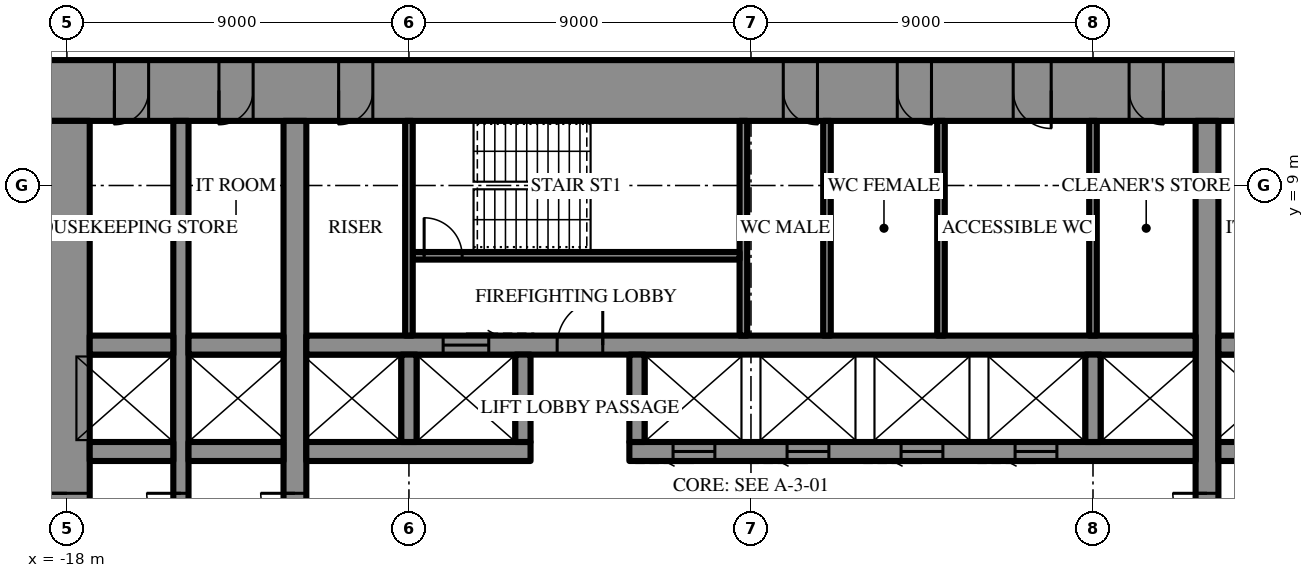
"""IFC4 building model, lengths in metres.
Left out: names, types, materials, properties, quantities, classifications, styles, units other than length and angle.
Written with IfcOpenShell. Run it as: python <this file> out.ifc"""

import sys

from ifc_helpers import new_model, si_unit, direction, frame, frame_2d, origin, place, context, subcontext, project, spatial, rectangle, extrude, element, fill, save


model = new_model("IFC4")
c1 = context("Model", 3, precision=1e-05, world=origin(), true_north=direction((0.0, 1.0)))
c2 = subcontext(c1, "Body", "Model", "MODEL_VIEW")
j1 = project(units=[si_unit("LENGTHUNIT", "METRE"), si_unit("PLANEANGLEUNIT", "RADIAN")], contexts=[c1])
p1 = place(None, origin())
s1 = spatial("IfcSite", under=j1, at=p1, CompositionType="ELEMENT")
p2 = place(p1, origin())
s2 = spatial("IfcBuilding", under=s1, at=p2, CompositionType="ELEMENT")
p3 = place(p2, frame((0.0, 0.0, 69.7)))
s3 = spatial("IfcBuildingStorey", under=s2, at=p3, CompositionType="ELEMENT", Elevation=69.7)
p4 = place(p3, frame((-18.6, 11.5, 0.0), z_axis=(0.0, 0.0, 1.0), x_axis=(1.0, 0.0, 0.0)))
e1 = element("IfcWall", 1, at=p4, inside=s3, PredefinedType="SHEAR", context=c2, shape_type="SweptSolid", body=[
    extrude(rectangle(XDim=37.2, YDim=1.6, at=frame_2d((18.6, 0.0))), origin(), (0.0, 0.0, 1.0), 4.2),
])
p5 = place(p4, frame((19.45, 0.0, 0.0)))
e2 = element("IfcOpeningElement", 2, at=p5, cuts=e1, PredefinedType="OPENING", context=c2, shape_type="SweptSolid", body=[
    extrude(rectangle(XDim=0.9, YDim=2.2, at=frame_2d((0.45, 1.1))), frame((0.0, 0.81, 0.0), z_axis=(0.0, -1.0, 0.0), x_axis=(1.0, 0.0, 0.0)), (0.0, 0.0, 1.0), 1.62),
])
p6 = place(p4, frame((22.45, 0.0, 0.0)))
e3 = element("IfcOpeningElement", 3, at=p6, cuts=e1, PredefinedType="OPENING", context=c2, shape_type="SweptSolid", body=[
    extrude(rectangle(XDim=0.9, YDim=2.2, at=frame_2d((0.45, 1.1))), frame((0.0, 0.81, 0.0), z_axis=(0.0, -1.0, 0.0), x_axis=(1.0, 0.0, 0.0)), (0.0, 0.0, 1.0), 1.62),
])
p7 = place(p4, frame((25.5, 0.0, 0.0)))
e4 = element("IfcOpeningElement", 4, at=p7, cuts=e1, PredefinedType="OPENING", context=c2, shape_type="SweptSolid", body=[
    extrude(rectangle(XDim=1.0, YDim=2.2, at=frame_2d((0.5, 1.1))), frame((0.0, 0.81, 0.0), z_axis=(0.0, -1.0, 0.0), x_axis=(1.0, 0.0, 0.0)), (0.0, 0.0, 1.0), 1.62),
])
p8 = place(p4, frame((1.85, 0.0, 0.0)))
e5 = element("IfcOpeningElement", 5, at=p8, cuts=e1, PredefinedType="OPENING", context=c2, shape_type="SweptSolid", body=[
    extrude(rectangle(XDim=0.9, YDim=2.2, at=frame_2d((0.45, 1.1))), frame((0.0, 0.81, 0.0), z_axis=(0.0, -1.0, 0.0), x_axis=(1.0, 0.0, 0.0)), (0.0, 0.0, 1.0), 1.62),
])
p9 = place(p4, frame((4.6, 0.0, 0.0)))
e6 = element("IfcOpeningElement", 6, at=p9, cuts=e1, PredefinedType="OPENING", context=c2, shape_type="SweptSolid", body=[
    extrude(rectangle(XDim=0.9, YDim=2.2, at=frame_2d((0.45, 1.1))), frame((0.0, 0.81, 0.0), z_axis=(0.0, -1.0, 0.0), x_axis=(1.0, 0.0, 0.0)), (0.0, 0.0, 1.0), 1.62),
])
p10 = place(p4, frame((7.75, 0.0, 0.0)))
e7 = element("IfcOpeningElement", 7, at=p10, cuts=e1, PredefinedType="OPENING", context=c2, shape_type="SweptSolid", body=[
    extrude(rectangle(XDim=0.9, YDim=2.2, at=frame_2d((0.45, 1.1))), frame((0.0, 0.81, 0.0), z_axis=(0.0, -1.0, 0.0), x_axis=(1.0, 0.0, 0.0)), (0.0, 0.0, 1.0), 1.62),
])
p11 = place(p4, frame((28.55, 0.0, 0.0)))
e8 = element("IfcOpeningElement", 8, at=p11, cuts=e1, PredefinedType="OPENING", context=c2, shape_type="SweptSolid", body=[
    extrude(rectangle(XDim=0.9, YDim=2.2, at=frame_2d((0.45, 1.1))), frame((0.0, 0.81, 0.0), z_axis=(0.0, -1.0, 0.0), x_axis=(1.0, 0.0, 0.0)), (0.0, 0.0, 1.0), 1.62),
])
p12 = place(p4, frame((31.7, 0.0, 0.0)))
e9 = element("IfcOpeningElement", 9, at=p12, cuts=e1, PredefinedType="OPENING", context=c2, shape_type="SweptSolid", body=[
    extrude(rectangle(XDim=0.9, YDim=2.2, at=frame_2d((0.45, 1.1))), frame((0.0, 0.81, 0.0), z_axis=(0.0, -1.0, 0.0), x_axis=(1.0, 0.0, 0.0)), (0.0, 0.0, 1.0), 1.62),
])
p13 = place(p4, frame((34.45, 0.0, 0.0)))
e10 = element("IfcOpeningElement", 10, at=p13, cuts=e1, PredefinedType="OPENING", context=c2, shape_type="SweptSolid", body=[
    extrude(rectangle(XDim=0.9, YDim=2.2, at=frame_2d((0.45, 1.1))), frame((0.0, 0.81, 0.0), z_axis=(0.0, -1.0, 0.0), x_axis=(1.0, 0.0, 0.0)), (0.0, 0.0, 1.0), 1.62),
])
p14 = place(p3, frame((-18.0, 10.7, 0.0), z_axis=(0.0, 0.0, 1.0), x_axis=(0.0, -1.0, 0.0)))
e11 = element("IfcWall", 11, at=p14, inside=s3, PredefinedType="SHEAR", context=c2, shape_type="SweptSolid", body=[
    extrude(rectangle(XDim=21.4, YDim=1.2, at=frame_2d((10.7, 0.0))), origin(), (0.0, 0.0, 1.0), 4.2),
])
p15 = place(p14, frame((9.8, 0.0, 0.0)))
e12 = element("IfcOpeningElement", 12, at=p15, cuts=e11, PredefinedType="OPENING", context=c2, shape_type="SweptSolid", body=[
    extrude(rectangle(XDim=1.8, YDim=2.4, at=frame_2d((0.9, 1.2))), frame((0.0, 0.61, 0.0), z_axis=(0.0, -1.0, 0.0), x_axis=(1.0, 0.0, 0.0)), (0.0, 0.0, 1.0), 1.22),
])
p16 = place(p3, frame((12.0, -10.7, 0.0), z_axis=(0.0, 0.0, 1.0), x_axis=(0.0, 1.0, 0.0)))
e13 = element("IfcWall", 13, at=p16, inside=s3, PredefinedType="SHEAR", context=c2, shape_type="SweptSolid", body=[
    extrude(rectangle(XDim=21.4, YDim=0.6, at=frame_2d((10.7, 0.0))), origin(), (0.0, 0.0, 1.0), 4.2),
])
p17 = place(p16, frame((9.8, 0.0, 0.0)))
e14 = element("IfcOpeningElement", 14, at=p17, cuts=e13, PredefinedType="OPENING", context=c2, shape_type="SweptSolid", body=[
    extrude(rectangle(XDim=1.8, YDim=2.4, at=frame_2d((0.9, 1.2))), frame((0.0, 0.31, 0.0), z_axis=(0.0, -1.0, 0.0), x_axis=(1.0, 0.0, 0.0)), (0.0, 0.0, 1.0), 0.62),
])
p18 = place(p3, frame((-12.0, -10.7, 0.0), z_axis=(0.0, 0.0, 1.0), x_axis=(0.0, 1.0, 0.0)))
e15 = element("IfcWall", 15, at=p18, inside=s3, PredefinedType="SHEAR", context=c2, shape_type="SweptSolid", body=[
    extrude(rectangle(XDim=21.4, YDim=0.6, at=frame_2d((10.7, 0.0))), origin(), (0.0, 0.0, 1.0), 4.2),
])
p19 = place(p18, frame((9.8, 0.0, 0.0)))
e16 = element("IfcOpeningElement", 16, at=p19, cuts=e15, PredefinedType="OPENING", context=c2, shape_type="SweptSolid", body=[
    extrude(rectangle(XDim=1.8, YDim=2.4, at=frame_2d((0.9, 1.2))), frame((0.0, 0.31, 0.0), z_axis=(0.0, -1.0, 0.0), x_axis=(1.0, 0.0, 0.0)), (0.0, 0.0, 1.0), 0.62),
])
p20 = place(p3, frame((-15.0, -10.7, 0.0), z_axis=(0.0, 0.0, 1.0), x_axis=(0.0, 1.0, 0.0)))
e17 = element("IfcWall", 17, at=p20, inside=s3, PredefinedType="SHEAR", context=c2, shape_type="SweptSolid", body=[
    extrude(rectangle(XDim=21.4, YDim=0.4, at=frame_2d((10.7, 0.0))), origin(), (0.0, 0.0, 1.0), 4.2),
])
p21 = place(p20, frame((9.8, 0.0, 0.0)))
e18 = element("IfcOpeningElement", 18, at=p21, cuts=e17, PredefinedType="OPENING", context=c2, shape_type="SweptSolid", body=[
    extrude(rectangle(XDim=1.8, YDim=2.4, at=frame_2d((0.9, 1.2))), frame((0.0, 0.21, 0.0), z_axis=(0.0, -1.0, 0.0), x_axis=(1.0, 0.0, 0.0)), (0.0, 0.0, 1.0), 0.42),
])
p22 = place(p3, frame((-17.4, 2.0, 0.0), z_axis=(0.0, 0.0, 1.0), x_axis=(1.0, 0.0, 0.0)))
e19 = element("IfcWall", 19, at=p22, inside=s3, PredefinedType="SHEAR", context=c2, shape_type="SweptSolid", body=[
    extrude(rectangle(XDim=2.2, YDim=0.5, at=frame_2d((1.1, 0.0))), origin(), (0.0, 0.0, 1.0), 4.2),
])
p23 = place(p3, frame((-14.8, 2.0, 0.0), z_axis=(0.0, 0.0, 1.0), x_axis=(1.0, 0.0, 0.0)))
e20 = element("IfcWall", 20, at=p23, inside=s3, PredefinedType="SHEAR", context=c2, shape_type="SweptSolid", body=[
    extrude(rectangle(XDim=2.5, YDim=0.5, at=frame_2d((1.25, 0.0))), origin(), (0.0, 0.0, 1.0), 4.2),
])
p24 = place(p3, frame((-11.7, 2.0, 0.0), z_axis=(0.0, 0.0, 1.0), x_axis=(1.0, 0.0, 0.0)))
e21 = element("IfcWall", 21, at=p24, inside=s3, PredefinedType="SHEAR", context=c2, shape_type="SweptSolid", body=[
    extrude(rectangle(XDim=5.9, YDim=0.5, at=frame_2d((2.95, 0.0))), origin(), (0.0, 0.0, 1.0), 4.2),
])
p25 = place(p3, frame((-3.2, 2.0, 0.0), z_axis=(0.0, 0.0, 1.0), x_axis=(1.0, 0.0, 0.0)))
e22 = element("IfcWall", 22, at=p25, inside=s3, PredefinedType="SHEAR", context=c2, shape_type="SweptSolid", body=[
    extrude(rectangle(XDim=14.9, YDim=0.5, at=frame_2d((7.45, 0.0))), origin(), (0.0, 0.0, 1.0), 4.2),
])
p26 = place(p25, frame((1.15, 0.0, 0.0)))
e23 = element("IfcOpeningElement", 23, at=p26, cuts=e22, PredefinedType="OPENING", context=c2, shape_type="SweptSolid", body=[
    extrude(rectangle(XDim=1.1, YDim=2.2, at=frame_2d((0.55, 1.1))), frame((0.0, 0.26, 0.0), z_axis=(0.0, -1.0, 0.0), x_axis=(1.0, 0.0, 0.0)), (0.0, 0.0, 1.0), 0.52),
])
p27 = place(p25, frame((4.15, 0.0, 0.0)))
e24 = element("IfcOpeningElement", 24, at=p27, cuts=e22, PredefinedType="OPENING", context=c2, shape_type="SweptSolid", body=[
    extrude(rectangle(XDim=1.1, YDim=2.2, at=frame_2d((0.55, 1.1))), frame((0.0, 0.26, 0.0), z_axis=(0.0, -1.0, 0.0), x_axis=(1.0, 0.0, 0.0)), (0.0, 0.0, 1.0), 0.52),
])
p28 = place(p25, frame((7.15, 0.0, 0.0)))
e25 = element("IfcOpeningElement", 25, at=p28, cuts=e22, PredefinedType="OPENING", context=c2, shape_type="SweptSolid", body=[
    extrude(rectangle(XDim=1.1, YDim=2.2, at=frame_2d((0.55, 1.1))), frame((0.0, 0.26, 0.0), z_axis=(0.0, -1.0, 0.0), x_axis=(1.0, 0.0, 0.0)), (0.0, 0.0, 1.0), 0.52),
])
p29 = place(p25, frame((10.15, 0.0, 0.0)))
e26 = element("IfcOpeningElement", 26, at=p29, cuts=e22, PredefinedType="OPENING", context=c2, shape_type="SweptSolid", body=[
    extrude(rectangle(XDim=1.1, YDim=2.2, at=frame_2d((0.55, 1.1))), frame((0.0, 0.26, 0.0), z_axis=(0.0, -1.0, 0.0), x_axis=(1.0, 0.0, 0.0)), (0.0, 0.0, 1.0), 0.52),
])
p30 = place(p3, frame((12.3, 2.0, 0.0), z_axis=(0.0, 0.0, 1.0), x_axis=(1.0, 0.0, 0.0)))
e27 = element("IfcWall", 27, at=p30, inside=s3, PredefinedType="SHEAR", context=c2, shape_type="SweptSolid", body=[
    extrude(rectangle(XDim=2.5, YDim=0.5, at=frame_2d((1.25, 0.0))), origin(), (0.0, 0.0, 1.0), 4.2),
])
p31 = place(p3, frame((-17.4, 4.8, 0.0), z_axis=(0.0, 0.0, 1.0), x_axis=(1.0, 0.0, 0.0)))
e28 = element("IfcWall", 28, at=p31, inside=s3, PredefinedType="SHEAR", context=c2, shape_type="SweptSolid", body=[
    extrude(rectangle(XDim=2.2, YDim=0.5, at=frame_2d((1.1, 0.0))), origin(), (0.0, 0.0, 1.0), 4.2),
])
p32 = place(p3, frame((-14.8, 4.8, 0.0), z_axis=(0.0, 0.0, 1.0), x_axis=(1.0, 0.0, 0.0)))
e29 = element("IfcWall", 29, at=p32, inside=s3, PredefinedType="SHEAR", context=c2, shape_type="SweptSolid", body=[
    extrude(rectangle(XDim=2.5, YDim=0.5, at=frame_2d((1.25, 0.0))), origin(), (0.0, 0.0, 1.0), 4.2),
])
p33 = place(p3, frame((-11.7, 4.8, 0.0), z_axis=(0.0, 0.0, 1.0), x_axis=(1.0, 0.0, 0.0)))
e30 = element("IfcWall", 30, at=p33, inside=s3, PredefinedType="SHEAR", context=c2, shape_type="SweptSolid", body=[
    extrude(rectangle(XDim=23.4, YDim=0.5, at=frame_2d((11.7, 0.0))), origin(), (0.0, 0.0, 1.0), 4.2),
])
p34 = place(p33, frame((6.6, 0.0, 0.0)))
e31 = element("IfcOpeningElement", 31, at=p34, cuts=e30, PredefinedType="OPENING", context=c2, shape_type="SweptSolid", body=[
    extrude(rectangle(XDim=1.2, YDim=2.2, at=frame_2d((0.6, 1.1))), frame((0.0, 0.26, 0.0), z_axis=(0.0, -1.0, 0.0), x_axis=(1.0, 0.0, 0.0)), (0.0, 0.0, 1.0), 0.52),
])
p35 = place(p33, frame((3.6, 0.0, 0.0)))
e32 = element("IfcOpeningElement", 32, at=p35, cuts=e30, PredefinedType="OPENING", context=c2, shape_type="SweptSolid", body=[
    extrude(rectangle(XDim=1.2, YDim=2.2, at=frame_2d((0.6, 1.1))), frame((0.0, 0.26, 0.0), z_axis=(0.0, -1.0, 0.0), x_axis=(1.0, 0.0, 0.0)), (0.0, 0.0, 1.0), 0.52),
])
p36 = place(p3, frame((12.3, 4.8, 0.0), z_axis=(0.0, 0.0, 1.0), x_axis=(1.0, 0.0, 0.0)))
e33 = element("IfcWall", 33, at=p36, inside=s3, PredefinedType="SHEAR", context=c2, shape_type="SweptSolid", body=[
    extrude(rectangle(XDim=2.5, YDim=0.5, at=frame_2d((1.25, 0.0))), origin(), (0.0, 0.0, 1.0), 4.2),
])
for number, where, z_axis, x_axis in (
    (34, (-9.0, 2.25, 0.0), (0.0, 0.0, 1.0), (0.0, 1.0, 0.0)),
    (35, (-6.0, 2.25, 0.0), (0.0, 0.0, 1.0), (0.0, 1.0, 0.0)),
    (36, (-3.0, 2.25, 0.0), (0.0, 0.0, 1.0), (0.0, 1.0, 0.0)),
    (37, (9.0, 2.25, 0.0), (0.0, 0.0, 1.0), (0.0, 1.0, 0.0)),
):
    element("IfcWall", number, at=place(p3, frame(where, z_axis=z_axis, x_axis=x_axis)), inside=s3, PredefinedType="SHEAR", context=c2, shape_type="SweptSolid", body=[
        extrude(rectangle(XDim=2.3, YDim=0.4, at=frame_2d((1.15, 0.0))), origin(), (0.0, 0.0, 1.0), 4.2),
    ])
p37 = place(p3, frame((-0.2, 5.05, 0.0), z_axis=(0.0, 0.0, 1.0), x_axis=(0.0, 1.0, 0.0)))
e38 = element("IfcWall", 38, at=p37, inside=s3, PredefinedType="SHEAR", context=c2, shape_type="SweptSolid", body=[
    extrude(rectangle(XDim=5.65, YDim=0.2, at=frame_2d((2.825, 0.0))), origin(), (0.0, 0.0, 1.0), 4.2),
])
p38 = place(p3, frame((-8.9, 7.15, 0.0), z_axis=(0.0, 0.0, 1.0), x_axis=(1.0, 0.0, 0.0)))
e39 = element("IfcWall", 39, at=p38, inside=s3, PredefinedType="SHEAR", context=c2, shape_type="SweptSolid", body=[
    extrude(rectangle(XDim=8.6, YDim=0.2, at=frame_2d((4.3, 0.0))), origin(), (0.0, 0.0, 1.0), 4.2),
])
p39 = place(p38, frame((0.3, 0.0, 0.0)))
e40 = element("IfcOpeningElement", 40, at=p39, cuts=e39, PredefinedType="OPENING", context=c2, shape_type="SweptSolid", body=[
    extrude(rectangle(XDim=1.0, YDim=2.2, at=frame_2d((0.5, 1.1))), frame((0.0, 0.11, 0.0), z_axis=(0.0, -1.0, 0.0), x_axis=(1.0, 0.0, 0.0)), (0.0, 0.0, 1.0), 0.22),
])
for number, where, z_axis, x_axis in (
    (41, (-9.0, 5.05, 0.0), (0.0, 0.0, 1.0), (0.0, 1.0, 0.0)),
    (42, (9.0, 5.05, 0.0), (0.0, 0.0, 1.0), (0.0, 1.0, 0.0)),
    (43, (2.0, 5.05, 0.0), (0.0, 0.0, 1.0), (0.0, 1.0, 0.0)),
    (44, (5.0, 5.05, 0.0), (0.0, 0.0, 1.0), (0.0, 1.0, 0.0)),
):
    element("IfcWall", number, at=place(p3, frame(where, z_axis=z_axis, x_axis=x_axis)), inside=s3, PredefinedType="PARTITIONING", context=c2, shape_type="SweptSolid", body=[
        extrude(rectangle(XDim=5.65, YDim=0.2, at=frame_2d((2.825, 0.0))), origin(), (0.0, 0.0, 1.0), 4.0),
    ])
p40 = place(p15, frame((1.8, 0.0, 0.0), z_axis=(0.0, 0.0, 1.0), x_axis=(-1.0, 0.0, 0.0)))
e45 = element("IfcDoor", 45, at=p40, inside=s3, OperationType="DOUBLE_DOOR_SINGLE_SWING", PredefinedType="DOOR", context=c2, shape_type="SweptSolid", body=[
    extrude(rectangle(XDim=1.8, YDim=2.4, at=frame_2d((0.9, 1.2))), frame((0.0, 0.025, 0.0), z_axis=(0.0, -1.0, 0.0), x_axis=(1.0, 0.0, 0.0)), (0.0, 0.0, 1.0), 0.05),
])
fill(e12, e45)
p41 = place(p34, origin())
e46 = element("IfcDoor", 46, at=p41, inside=s3, OperationType="SINGLE_SWING_LEFT", PredefinedType="DOOR", context=c2, shape_type="SweptSolid", body=[
    extrude(rectangle(XDim=1.2, YDim=2.2, at=frame_2d((0.6, 1.1))), frame((0.0, 0.025, 0.0), z_axis=(0.0, -1.0, 0.0), x_axis=(1.0, 0.0, 0.0)), (0.0, 0.0, 1.0), 0.05),
])
fill(e31, e46)
p42 = place(p39, origin())
e47 = element("IfcDoor", 47, at=p42, inside=s3, OperationType="SINGLE_SWING_RIGHT", PredefinedType="DOOR", context=c2, shape_type="SweptSolid", body=[
    extrude(rectangle(XDim=1.0, YDim=2.2, at=frame_2d((0.5, 1.1))), frame((0.0, 0.025, 0.0), z_axis=(0.0, -1.0, 0.0), x_axis=(1.0, 0.0, 0.0)), (0.0, 0.0, 1.0), 0.05),
])
fill(e40, e47)
p43 = place(p5, frame((0.9, 0.0, 0.0), z_axis=(0.0, 0.0, 1.0), x_axis=(-1.0, 0.0, 0.0)))
e48 = element("IfcDoor", 48, at=p43, inside=s3, OperationType="SINGLE_SWING_RIGHT", PredefinedType="DOOR", context=c2, shape_type="SweptSolid", body=[
    extrude(rectangle(XDim=0.9, YDim=2.2, at=frame_2d((0.45, 1.1))), frame((0.0, 0.025, 0.0), z_axis=(0.0, -1.0, 0.0), x_axis=(1.0, 0.0, 0.0)), (0.0, 0.0, 1.0), 0.05),
])
fill(e2, e48)
p44 = place(p6, frame((0.9, 0.0, 0.0), z_axis=(0.0, 0.0, 1.0), x_axis=(-1.0, 0.0, 0.0)))
e49 = element("IfcDoor", 49, at=p44, inside=s3, OperationType="SINGLE_SWING_RIGHT", PredefinedType="DOOR", context=c2, shape_type="SweptSolid", body=[
    extrude(rectangle(XDim=0.9, YDim=2.2, at=frame_2d((0.45, 1.1))), frame((0.0, 0.025, 0.0), z_axis=(0.0, -1.0, 0.0), x_axis=(1.0, 0.0, 0.0)), (0.0, 0.0, 1.0), 0.05),
])
fill(e3, e49)
p45 = place(p7, frame((1.0, 0.0, 0.0), z_axis=(0.0, 0.0, 1.0), x_axis=(-1.0, 0.0, 0.0)))
e50 = element("IfcDoor", 50, at=p45, inside=s3, OperationType="SINGLE_SWING_RIGHT", PredefinedType="DOOR", context=c2, shape_type="SweptSolid", body=[
    extrude(rectangle(XDim=1.0, YDim=2.2, at=frame_2d((0.5, 1.1))), frame((0.0, 0.025, 0.0), z_axis=(0.0, -1.0, 0.0), x_axis=(1.0, 0.0, 0.0)), (0.0, 0.0, 1.0), 0.05),
])
fill(e4, e50)
p46 = place(p8, frame((0.9, 0.0, 0.0), z_axis=(0.0, 0.0, 1.0), x_axis=(-1.0, 0.0, 0.0)))
e51 = element("IfcDoor", 51, at=p46, inside=s3, OperationType="SINGLE_SWING_LEFT", PredefinedType="DOOR", context=c2, shape_type="SweptSolid", body=[
    extrude(rectangle(XDim=0.9, YDim=2.2, at=frame_2d((0.45, 1.1))), frame((0.0, 0.025, 0.0), z_axis=(0.0, -1.0, 0.0), x_axis=(1.0, 0.0, 0.0)), (0.0, 0.0, 1.0), 0.05),
])
fill(e5, e51)
p47 = place(p9, frame((0.9, 0.0, 0.0), z_axis=(0.0, 0.0, 1.0), x_axis=(-1.0, 0.0, 0.0)))
e52 = element("IfcDoor", 52, at=p47, inside=s3, OperationType="SINGLE_SWING_LEFT", PredefinedType="DOOR", context=c2, shape_type="SweptSolid", body=[
    extrude(rectangle(XDim=0.9, YDim=2.2, at=frame_2d((0.45, 1.1))), frame((0.0, 0.025, 0.0), z_axis=(0.0, -1.0, 0.0), x_axis=(1.0, 0.0, 0.0)), (0.0, 0.0, 1.0), 0.05),
])
fill(e6, e52)
p48 = place(p10, frame((0.9, 0.0, 0.0), z_axis=(0.0, 0.0, 1.0), x_axis=(-1.0, 0.0, 0.0)))
e53 = element("IfcDoor", 53, at=p48, inside=s3, OperationType="SINGLE_SWING_LEFT", PredefinedType="DOOR", context=c2, shape_type="SweptSolid", body=[
    extrude(rectangle(XDim=0.9, YDim=2.2, at=frame_2d((0.45, 1.1))), frame((0.0, 0.025, 0.0), z_axis=(0.0, -1.0, 0.0), x_axis=(1.0, 0.0, 0.0)), (0.0, 0.0, 1.0), 0.05),
])
fill(e7, e53)
p49 = place(p11, frame((0.9, 0.0, 0.0), z_axis=(0.0, 0.0, 1.0), x_axis=(-1.0, 0.0, 0.0)))
e54 = element("IfcDoor", 54, at=p49, inside=s3, OperationType="SINGLE_SWING_RIGHT", PredefinedType="DOOR", context=c2, shape_type="SweptSolid", body=[
    extrude(rectangle(XDim=0.9, YDim=2.2, at=frame_2d((0.45, 1.1))), frame((0.0, 0.025, 0.0), z_axis=(0.0, -1.0, 0.0), x_axis=(1.0, 0.0, 0.0)), (0.0, 0.0, 1.0), 0.05),
])
fill(e8, e54)
p50 = place(p17, origin())
e55 = element("IfcDoor", 55, at=p50, inside=s3, OperationType="DOUBLE_DOOR_SINGLE_SWING", PredefinedType="DOOR", context=c2, shape_type="SweptSolid", body=[
    extrude(rectangle(XDim=1.8, YDim=2.4, at=frame_2d((0.9, 1.2))), frame((0.0, 0.025, 0.0), z_axis=(0.0, -1.0, 0.0), x_axis=(1.0, 0.0, 0.0)), (0.0, 0.0, 1.0), 0.05),
])
fill(e14, e55)
p51 = place(p19, origin())
e56 = element("IfcDoor", 56, at=p51, inside=s3, OperationType="DOUBLE_DOOR_SINGLE_SWING", PredefinedType="DOOR", context=c2, shape_type="SweptSolid", body=[
    extrude(rectangle(XDim=1.8, YDim=2.4, at=frame_2d((0.9, 1.2))), frame((0.0, 0.025, 0.0), z_axis=(0.0, -1.0, 0.0), x_axis=(1.0, 0.0, 0.0)), (0.0, 0.0, 1.0), 0.05),
])
fill(e16, e56)
p52 = place(p21, origin())
e57 = element("IfcDoor", 57, at=p52, inside=s3, OperationType="DOUBLE_DOOR_SINGLE_SWING", PredefinedType="DOOR", context=c2, shape_type="SweptSolid", body=[
    extrude(rectangle(XDim=1.8, YDim=2.4, at=frame_2d((0.9, 1.2))), frame((0.0, 0.025, 0.0), z_axis=(0.0, -1.0, 0.0), x_axis=(1.0, 0.0, 0.0)), (0.0, 0.0, 1.0), 0.05),
])
fill(e18, e57)
p53 = place(p35, origin())
e58 = element("IfcDoor", 58, at=p53, inside=s3, OperationType="SLIDING_TO_LEFT", PredefinedType="DOOR", context=c2, shape_type="SweptSolid", body=[
    extrude(rectangle(XDim=1.2, YDim=2.2, at=frame_2d((0.6, 1.1))), frame((0.0, 0.025, 0.0), z_axis=(0.0, -1.0, 0.0), x_axis=(1.0, 0.0, 0.0)), (0.0, 0.0, 1.0), 0.05),
])
fill(e32, e58)
p54 = place(p26, frame((1.1, 0.0, 0.0), z_axis=(0.0, 0.0, 1.0), x_axis=(-1.0, 0.0, 0.0)))
e59 = element("IfcDoor", 59, at=p54, inside=s3, OperationType="SLIDING_TO_LEFT", PredefinedType="DOOR", context=c2, shape_type="SweptSolid", body=[
    extrude(rectangle(XDim=1.1, YDim=2.2, at=frame_2d((0.55, 1.1))), frame((0.0, 0.025, 0.0), z_axis=(0.0, -1.0, 0.0), x_axis=(1.0, 0.0, 0.0)), (0.0, 0.0, 1.0), 0.05),
])
fill(e23, e59)
p55 = place(p27, frame((1.1, 0.0, 0.0), z_axis=(0.0, 0.0, 1.0), x_axis=(-1.0, 0.0, 0.0)))
e60 = element("IfcDoor", 60, at=p55, inside=s3, OperationType="SLIDING_TO_LEFT", PredefinedType="DOOR", context=c2, shape_type="SweptSolid", body=[
    extrude(rectangle(XDim=1.1, YDim=2.2, at=frame_2d((0.55, 1.1))), frame((0.0, 0.025, 0.0), z_axis=(0.0, -1.0, 0.0), x_axis=(1.0, 0.0, 0.0)), (0.0, 0.0, 1.0), 0.05),
])
fill(e24, e60)
p56 = place(p28, frame((1.1, 0.0, 0.0), z_axis=(0.0, 0.0, 1.0), x_axis=(-1.0, 0.0, 0.0)))
e61 = element("IfcDoor", 61, at=p56, inside=s3, OperationType="SLIDING_TO_LEFT", PredefinedType="DOOR", context=c2, shape_type="SweptSolid", body=[
    extrude(rectangle(XDim=1.1, YDim=2.2, at=frame_2d((0.55, 1.1))), frame((0.0, 0.025, 0.0), z_axis=(0.0, -1.0, 0.0), x_axis=(1.0, 0.0, 0.0)), (0.0, 0.0, 1.0), 0.05),
])
fill(e25, e61)
p57 = place(p29, frame((1.1, 0.0, 0.0), z_axis=(0.0, 0.0, 1.0), x_axis=(-1.0, 0.0, 0.0)))
e62 = element("IfcDoor", 62, at=p57, inside=s3, OperationType="SLIDING_TO_LEFT", PredefinedType="DOOR", context=c2, shape_type="SweptSolid", body=[
    extrude(rectangle(XDim=1.1, YDim=2.2, at=frame_2d((0.55, 1.1))), frame((0.0, 0.025, 0.0), z_axis=(0.0, -1.0, 0.0), x_axis=(1.0, 0.0, 0.0)), (0.0, 0.0, 1.0), 0.05),
])
fill(e26, e62)
save(model, sys.argv[1])
